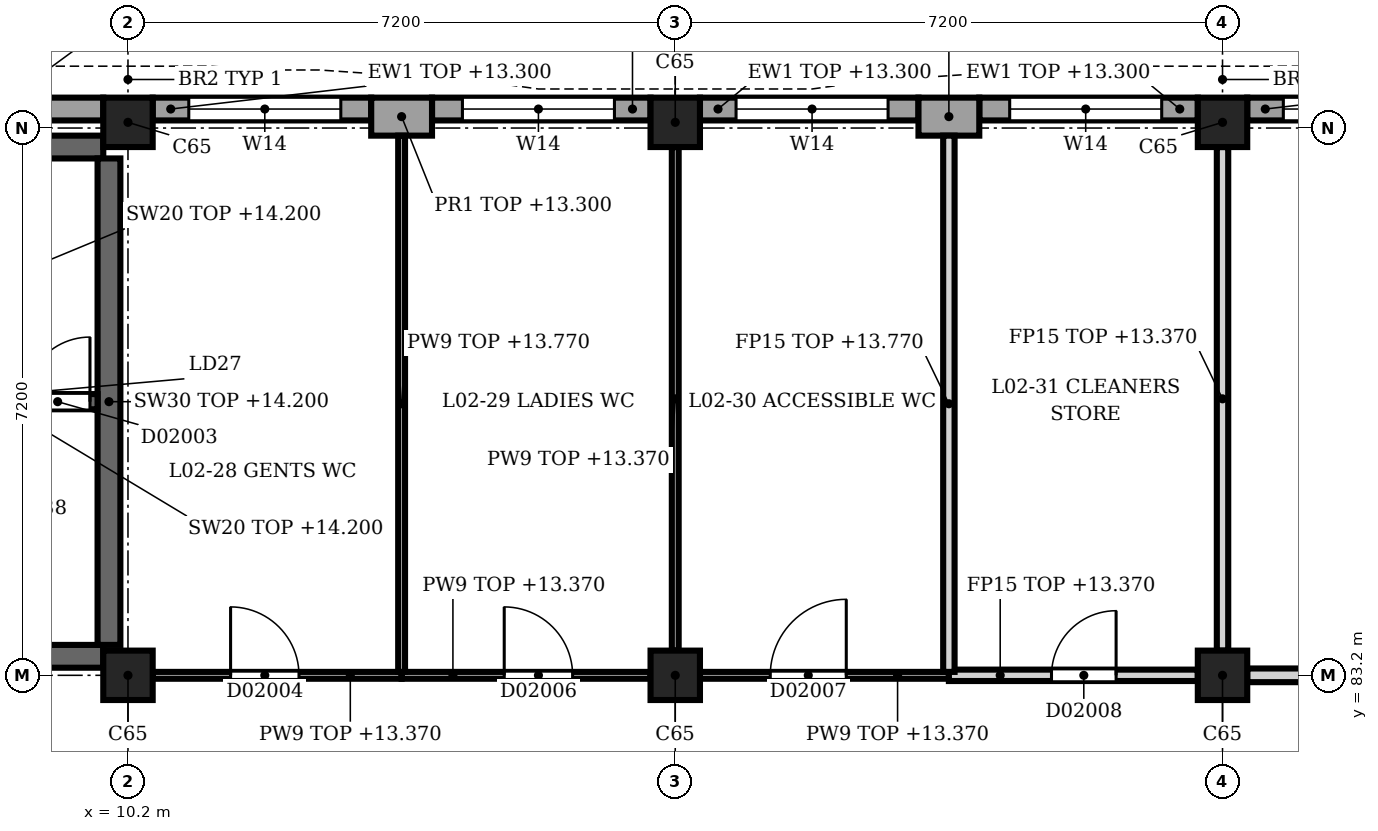
"""IFC4 building model, lengths in metres.
Left out: names, types, materials, properties, quantities, classifications, styles, units other than length and angle.
Written with IfcOpenShell. Run it as: python <this file> out.ifc"""

import sys

from ifc_helpers import new_model, si_unit, direction, frame, frame_2d, origin, origin_2d, place, context, subcontext, project, spatial, rectangle, extrude, element, fill, save


model = new_model("IFC4")
c1 = context("Model", 3, precision=1e-05, world=origin(), true_north=direction((0.0, 1.0)))
c2 = subcontext(c1, "Body", "Model", "MODEL_VIEW")
j1 = project(units=[si_unit("LENGTHUNIT", "METRE"), si_unit("PLANEANGLEUNIT", "RADIAN")], contexts=[c1])
p1 = place(None, origin())
s1 = spatial("IfcSite", under=j1, at=p1, CompositionType="ELEMENT")
p2 = place(p1, origin())
s2 = spatial("IfcBuilding", under=s1, at=p2, CompositionType="ELEMENT")
p3 = place(p2, frame((0.0, 0.0, 9.9)))
s3 = spatial("IfcBuildingStorey", under=s2, at=p3, CompositionType="ELEMENT", Elevation=9.9)
for number, where, z_axis, x_axis in (
    (1, (10.2, 83.2, 0.0), (0.0, 0.0, 1.0), (1.0, 0.0, 0.0)),
    (2, (10.2, 90.475, 0.0), (0.0, 0.0, 1.0), (1.0, 0.0, 0.0)),
    (3, (17.4, 83.2, 0.0), (0.0, 0.0, 1.0), (1.0, 0.0, 0.0)),
    (4, (17.4, 90.475, 0.0), (0.0, 0.0, 1.0), (1.0, 0.0, 0.0)),
    (5, (24.6, 83.2, 0.0), (0.0, 0.0, 1.0), (1.0, 0.0, 0.0)),
    (6, (24.6, 90.475, 0.0), (0.0, 0.0, 1.0), (1.0, 0.0, 0.0)),
):
    element("IfcColumn", number, at=place(p3, frame(where, z_axis=z_axis, x_axis=x_axis)), inside=s3, PredefinedType="COLUMN", context=c2, shape_type="SweptSolid", body=[
        extrude(rectangle(XDim=0.65, YDim=0.65, at=origin_2d()), origin(), (0.0, 0.0, 1.0), 4.5),
    ])
p4 = place(p3, frame((13.4, 90.55, 0.0), z_axis=(0.0, 0.0, 1.0), x_axis=(1.0, 0.0, 0.0)))
e7 = element("IfcWall", 7, at=p4, inside=s3, PredefinedType="SOLIDWALL", context=c2, shape_type="SweptSolid", body=[
    extrude(rectangle(XDim=0.8, YDim=0.5, at=frame_2d((0.4, 0.0))), origin(), (0.0, 0.0, 1.0), 3.4),
])
p5 = place(p3, frame((20.6, 90.55, 0.0), z_axis=(0.0, 0.0, 1.0), x_axis=(1.0, 0.0, 0.0)))
e8 = element("IfcWall", 8, at=p5, inside=s3, PredefinedType="SOLIDWALL", context=c2, shape_type="SweptSolid", body=[
    extrude(rectangle(XDim=0.8, YDim=0.5, at=frame_2d((0.4, 0.0))), origin(), (0.0, 0.0, 1.0), 3.4),
])
p6 = place(p3, frame((7.0, 90.65, 0.0), z_axis=(0.0, 0.0, 1.0), x_axis=(1.0, 0.0, 0.0)))
e9 = element("IfcWall", 9, at=p6, inside=s3, PredefinedType="SOLIDWALL", context=c2, shape_type="SweptSolid", body=[
    extrude(rectangle(XDim=2.875, YDim=0.3, at=frame_2d((1.438, 0.0))), origin(), (0.0, 0.0, 1.0), 3.4),
])
p7 = place(p3, frame((10.525, 90.65, 0.0), z_axis=(0.0, 0.0, 1.0), x_axis=(1.0, 0.0, 0.0)))
e10 = element("IfcWall", 10, at=p7, inside=s3, PredefinedType="SOLIDWALL", context=c2, shape_type="SweptSolid", body=[
    extrude(rectangle(XDim=2.875, YDim=0.3, at=frame_2d((1.438, 0.0))), origin(), (0.0, 0.0, 1.0), 3.4),
])
p8 = place(p7, frame((0.475, 0.0, 0.9)))
e11 = element("IfcOpeningElement", 11, at=p8, cuts=e10, PredefinedType="OPENING", context=c2, shape_type="SweptSolid", body=[
    extrude(rectangle(XDim=2.0, YDim=2.4, at=frame_2d((1.0, 1.2))), frame((0.0, 0.16, 0.0), z_axis=(0.0, -1.0, 0.0), x_axis=(1.0, 0.0, 0.0)), (0.0, 0.0, 1.0), 0.32),
])
p9 = place(p3, frame((14.2, 90.65, 0.0), z_axis=(0.0, 0.0, 1.0), x_axis=(1.0, 0.0, 0.0)))
e12 = element("IfcWall", 12, at=p9, inside=s3, PredefinedType="SOLIDWALL", context=c2, shape_type="SweptSolid", body=[
    extrude(rectangle(XDim=2.875, YDim=0.3, at=frame_2d((1.438, 0.0))), origin(), (0.0, 0.0, 1.0), 3.4),
])
p10 = place(p9, frame((0.4, 0.0, 0.9)))
e13 = element("IfcOpeningElement", 13, at=p10, cuts=e12, PredefinedType="OPENING", context=c2, shape_type="SweptSolid", body=[
    extrude(rectangle(XDim=2.0, YDim=2.4, at=frame_2d((1.0, 1.2))), frame((0.0, 0.16, 0.0), z_axis=(0.0, -1.0, 0.0), x_axis=(1.0, 0.0, 0.0)), (0.0, 0.0, 1.0), 0.32),
])
p11 = place(p3, frame((17.725, 90.65, 0.0), z_axis=(0.0, 0.0, 1.0), x_axis=(1.0, 0.0, 0.0)))
e14 = element("IfcWall", 14, at=p11, inside=s3, PredefinedType="SOLIDWALL", context=c2, shape_type="SweptSolid", body=[
    extrude(rectangle(XDim=2.875, YDim=0.3, at=frame_2d((1.438, 0.0))), origin(), (0.0, 0.0, 1.0), 3.4),
])
p12 = place(p11, frame((0.475, 0.0, 0.9)))
e15 = element("IfcOpeningElement", 15, at=p12, cuts=e14, PredefinedType="OPENING", context=c2, shape_type="SweptSolid", body=[
    extrude(rectangle(XDim=2.0, YDim=2.4, at=frame_2d((1.0, 1.2))), frame((0.0, 0.16, 0.0), z_axis=(0.0, -1.0, 0.0), x_axis=(1.0, 0.0, 0.0)), (0.0, 0.0, 1.0), 0.32),
])
p13 = place(p3, frame((21.4, 90.65, 0.0), z_axis=(0.0, 0.0, 1.0), x_axis=(1.0, 0.0, 0.0)))
e16 = element("IfcWall", 16, at=p13, inside=s3, PredefinedType="SOLIDWALL", context=c2, shape_type="SweptSolid", body=[
    extrude(rectangle(XDim=2.875, YDim=0.3, at=frame_2d((1.438, 0.0))), origin(), (0.0, 0.0, 1.0), 3.4),
])
p14 = place(p13, frame((0.4, 0.0, 0.9)))
e17 = element("IfcOpeningElement", 17, at=p14, cuts=e16, PredefinedType="OPENING", context=c2, shape_type="SweptSolid", body=[
    extrude(rectangle(XDim=2.0, YDim=2.4, at=frame_2d((1.0, 1.2))), frame((0.0, 0.16, 0.0), z_axis=(0.0, -1.0, 0.0), x_axis=(1.0, 0.0, 0.0)), (0.0, 0.0, 1.0), 0.32),
])
p15 = place(p3, frame((24.925, 90.65, 0.0), z_axis=(0.0, 0.0, 1.0), x_axis=(1.0, 0.0, 0.0)))
e18 = element("IfcWall", 18, at=p15, inside=s3, PredefinedType="SOLIDWALL", context=c2, shape_type="SweptSolid", body=[
    extrude(rectangle(XDim=2.875, YDim=0.3, at=frame_2d((1.438, 0.0))), origin(), (0.0, 0.0, 1.0), 3.4),
])
p16 = place(p15, frame((0.475, 0.0, 0.9)))
e19 = element("IfcOpeningElement", 19, at=p16, cuts=e18, PredefinedType="OPENING", context=c2, shape_type="SweptSolid", body=[
    extrude(rectangle(XDim=2.0, YDim=2.4, at=frame_2d((1.0, 1.2))), frame((0.0, 0.16, 0.0), z_axis=(0.0, -1.0, 0.0), x_axis=(1.0, 0.0, 0.0)), (0.0, 0.0, 1.0), 0.32),
])
p17 = place(p3, frame((3.25, 83.45, 0.0), z_axis=(0.0, 0.0, 1.0), x_axis=(1.0, 0.0, 0.0)))
e20 = element("IfcWall", 20, at=p17, inside=s3, PredefinedType="SHEAR", context=c2, shape_type="SweptSolid", body=[
    extrude(rectangle(XDim=6.625, YDim=0.3, at=frame_2d((3.312, 0.0))), origin(), (0.0, 0.0, 1.0), 4.3),
])
p18 = place(p17, frame((4.35, 0.0, 0.0)))
e21 = element("IfcOpeningElement", 21, at=p18, cuts=e20, PredefinedType="OPENING", context=c2, shape_type="SweptSolid", body=[
    extrude(rectangle(XDim=1.2, YDim=2.1, at=frame_2d((0.6, 1.05))), frame((0.0, 0.16, 0.0), z_axis=(0.0, -1.0, 0.0), x_axis=(1.0, 0.0, 0.0)), (0.0, 0.0, 1.0), 0.32),
])
p19 = place(p3, frame((3.25, 90.15, 0.0), z_axis=(0.0, 0.0, 1.0), x_axis=(1.0, 0.0, 0.0)))
e22 = element("IfcWall", 22, at=p19, inside=s3, PredefinedType="SHEAR", context=c2, shape_type="SweptSolid", body=[
    extrude(rectangle(XDim=6.625, YDim=0.3, at=frame_2d((3.312, 0.0))), origin(), (0.0, 0.0, 1.0), 4.3),
])
p20 = place(p19, frame((1.25, 0.0, 1.2)))
e23 = element("IfcOpeningElement", 23, at=p20, cuts=e22, PredefinedType="OPENING", context=c2, shape_type="SweptSolid", body=[
    extrude(rectangle(XDim=0.6, YDim=1.8, at=frame_2d((0.3, 0.9))), frame((0.0, 0.16, 0.0), z_axis=(0.0, -1.0, 0.0), x_axis=(1.0, 0.0, 0.0)), (0.0, 0.0, 1.0), 0.32),
])
p21 = place(p3, frame((9.95, 83.6, 0.0), z_axis=(0.0, 0.0, 1.0), x_axis=(0.0, 1.0, 0.0)))
e24 = element("IfcWall", 24, at=p21, inside=s3, PredefinedType="SHEAR", context=c2, shape_type="SweptSolid", body=[
    extrude(rectangle(XDim=6.4, YDim=0.3, at=frame_2d((3.2, 0.0))), origin(), (0.0, 0.0, 1.0), 4.3),
])
p22 = place(p3, frame((9.8, 86.8, 0.0), z_axis=(0.0, 0.0, 1.0), x_axis=(-1.0, 0.0, 0.0)))
e25 = element("IfcWall", 25, at=p22, inside=s3, PredefinedType="SHEAR", context=c2, shape_type="SweptSolid", body=[
    extrude(rectangle(XDim=3.25, YDim=0.2, at=frame_2d((1.625, 0.0))), origin(), (0.0, 0.0, 1.0), 4.3),
])
p23 = place(p22, frame((1.7, 0.0, 0.0)))
e26 = element("IfcOpeningElement", 26, at=p23, cuts=e25, PredefinedType="OPENING", context=c2, shape_type="SweptSolid", body=[
    extrude(rectangle(XDim=1.1, YDim=2.1, at=frame_2d((0.55, 1.05))), frame((0.0, 0.11, 0.0), z_axis=(0.0, -1.0, 0.0), x_axis=(1.0, 0.0, 0.0)), (0.0, 0.0, 1.0), 0.22),
])
p24 = place(p22, frame((0.1, 0.0, 0.0)))
e27 = element("IfcOpeningElement", 27, at=p24, cuts=e25, PredefinedType="OPENING", context=c2, shape_type="SweptSolid", body=[
    extrude(rectangle(XDim=0.85, YDim=2.1, at=frame_2d((0.425, 1.05))), frame((0.0, 0.11, 0.0), z_axis=(0.0, -1.0, 0.0), x_axis=(1.0, 0.0, 0.0)), (0.0, 0.0, 1.0), 0.22),
])
p25 = place(p3, frame((10.525, 83.2, 0.0), z_axis=(0.0, 0.0, 1.0), x_axis=(1.0, 0.0, 0.0)))
e28 = element("IfcWall", 28, at=p25, inside=s3, PredefinedType="PARTITIONING", context=c2, shape_type="SweptSolid", body=[
    extrude(rectangle(XDim=3.275, YDim=0.09, at=frame_2d((1.638, 0.0))), origin(), (0.0, 0.0, 1.0), 3.47),
])
p26 = place(p25, frame((1.025, 0.0, 0.0)))
e29 = element("IfcOpeningElement", 29, at=p26, cuts=e28, PredefinedType="OPENING", context=c2, shape_type="SweptSolid", body=[
    extrude(rectangle(XDim=0.9, YDim=2.1, at=frame_2d((0.45, 1.05))), frame((0.0, 0.055, 0.0), z_axis=(0.0, -1.0, 0.0), x_axis=(1.0, 0.0, 0.0)), (0.0, 0.0, 1.0), 0.11),
])
p27 = place(p3, frame((13.8, 83.2, 0.0), z_axis=(0.0, 0.0, 1.0), x_axis=(1.0, 0.0, 0.0)))
e30 = element("IfcWall", 30, at=p27, inside=s3, PredefinedType="PARTITIONING", context=c2, shape_type="SweptSolid", body=[
    extrude(rectangle(XDim=3.275, YDim=0.09, at=frame_2d((1.637, 0.0))), origin(), (0.0, 0.0, 1.0), 3.47),
])
p28 = place(p27, frame((1.35, 0.0, 0.0)))
e31 = element("IfcOpeningElement", 31, at=p28, cuts=e30, PredefinedType="OPENING", context=c2, shape_type="SweptSolid", body=[
    extrude(rectangle(XDim=0.9, YDim=2.1, at=frame_2d((0.45, 1.05))), frame((0.0, 0.055, 0.0), z_axis=(0.0, -1.0, 0.0), x_axis=(1.0, 0.0, 0.0)), (0.0, 0.0, 1.0), 0.11),
])
p29 = place(p3, frame((17.725, 83.2, 0.0), z_axis=(0.0, 0.0, 1.0), x_axis=(1.0, 0.0, 0.0)))
e32 = element("IfcWall", 32, at=p29, inside=s3, PredefinedType="PARTITIONING", context=c2, shape_type="SweptSolid", body=[
    extrude(rectangle(XDim=3.275, YDim=0.09, at=frame_2d((1.637, 0.0))), origin(), (0.0, 0.0, 1.0), 3.47),
])
p30 = place(p29, frame((0.925, 0.0, 0.0)))
e33 = element("IfcOpeningElement", 33, at=p30, cuts=e32, PredefinedType="OPENING", context=c2, shape_type="SweptSolid", body=[
    extrude(rectangle(XDim=1.0, YDim=2.2, at=frame_2d((0.5, 1.1))), frame((0.0, 0.055, 0.0), z_axis=(0.0, -1.0, 0.0), x_axis=(1.0, 0.0, 0.0)), (0.0, 0.0, 1.0), 0.11),
])
p31 = place(p3, frame((21.0, 83.2, 0.0), z_axis=(0.0, 0.0, 1.0), x_axis=(1.0, 0.0, 0.0)))
e34 = element("IfcWall", 34, at=p31, inside=s3, PredefinedType="PARTITIONING", context=c2, shape_type="SweptSolid", body=[
    extrude(rectangle(XDim=3.275, YDim=0.15, at=frame_2d((1.637, 0.0))), origin(), (0.0, 0.0, 1.0), 3.47),
])
p32 = place(p31, frame((1.35, 0.0, 0.0)))
e35 = element("IfcOpeningElement", 35, at=p32, cuts=e34, PredefinedType="OPENING", context=c2, shape_type="SweptSolid", body=[
    extrude(rectangle(XDim=0.85, YDim=2.1, at=frame_2d((0.425, 1.05))), frame((0.0, 0.085, 0.0), z_axis=(0.0, -1.0, 0.0), x_axis=(1.0, 0.0, 0.0)), (0.0, 0.0, 1.0), 0.17),
])
p33 = place(p3, frame((24.925, 83.2, 0.0), z_axis=(0.0, 0.0, 1.0), x_axis=(1.0, 0.0, 0.0)))
e36 = element("IfcWall", 36, at=p33, inside=s3, PredefinedType="PARTITIONING", context=c2, shape_type="SweptSolid", body=[
    extrude(rectangle(XDim=6.55, YDim=0.18, at=frame_2d((3.275, 0.0))), origin(), (0.0, 0.0, 1.0), 3.47),
])
p34 = place(p33, frame((4.525, 0.0, 0.0)))
e37 = element("IfcOpeningElement", 37, at=p34, cuts=e36, PredefinedType="OPENING", context=c2, shape_type="SweptSolid", body=[
    extrude(rectangle(XDim=1.1, YDim=2.3, at=frame_2d((0.55, 1.15))), frame((0.0, 0.1, 0.0), z_axis=(0.0, -1.0, 0.0), x_axis=(1.0, 0.0, 0.0)), (0.0, 0.0, 1.0), 0.2),
])
p35 = place(p3, frame((13.8, 83.245, 0.0), z_axis=(0.0, 0.0, 1.0), x_axis=(0.0, 1.0, 0.0)))
e38 = element("IfcWall", 38, at=p35, inside=s3, PredefinedType="PARTITIONING", context=c2, shape_type="SweptSolid", body=[
    extrude(rectangle(XDim=7.055, YDim=0.09, at=frame_2d((3.527, 0.0))), origin(), (0.0, 0.0, 1.0), 3.87),
])
p36 = place(p3, frame((17.4, 83.525, 0.0), z_axis=(0.0, 0.0, 1.0), x_axis=(0.0, 1.0, 0.0)))
e39 = element("IfcWall", 39, at=p36, inside=s3, PredefinedType="PARTITIONING", context=c2, shape_type="SweptSolid", body=[
    extrude(rectangle(XDim=6.625, YDim=0.09, at=frame_2d((3.312, 0.0))), origin(), (0.0, 0.0, 1.0), 3.47),
])
p37 = place(p3, frame((21.0, 83.245, 0.0), z_axis=(0.0, 0.0, 1.0), x_axis=(0.0, 1.0, 0.0)))
e40 = element("IfcWall", 40, at=p37, inside=s3, PredefinedType="PARTITIONING", context=c2, shape_type="SweptSolid", body=[
    extrude(rectangle(XDim=7.055, YDim=0.15, at=frame_2d((3.527, 0.0))), origin(), (0.0, 0.0, 1.0), 3.87),
])
p38 = place(p3, frame((24.6, 83.525, 0.0), z_axis=(0.0, 0.0, 1.0), x_axis=(0.0, 1.0, 0.0)))
e41 = element("IfcWall", 41, at=p38, inside=s3, PredefinedType="PARTITIONING", context=c2, shape_type="SweptSolid", body=[
    extrude(rectangle(XDim=6.625, YDim=0.15, at=frame_2d((3.312, 0.0))), origin(), (0.0, 0.0, 1.0), 3.47),
])
p39 = place(p8, origin())
e42 = element("IfcWindow", 42, at=p39, inside=s3, PartitioningType="SINGLE_PANEL", PredefinedType="WINDOW", context=c2, shape_type="SweptSolid", body=[
    extrude(rectangle(XDim=2.0, YDim=2.4, at=frame_2d((1.0, 1.2))), frame((0.0, 0.03, 0.0), z_axis=(0.0, -1.0, 0.0), x_axis=(1.0, 0.0, 0.0)), (0.0, 0.0, 1.0), 0.06),
])
fill(e11, e42)
p40 = place(p10, origin())
e43 = element("IfcWindow", 43, at=p40, inside=s3, PartitioningType="SINGLE_PANEL", PredefinedType="WINDOW", context=c2, shape_type="SweptSolid", body=[
    extrude(rectangle(XDim=2.0, YDim=2.4, at=frame_2d((1.0, 1.2))), frame((0.0, 0.03, 0.0), z_axis=(0.0, -1.0, 0.0), x_axis=(1.0, 0.0, 0.0)), (0.0, 0.0, 1.0), 0.06),
])
fill(e13, e43)
p41 = place(p12, origin())
e44 = element("IfcWindow", 44, at=p41, inside=s3, PartitioningType="SINGLE_PANEL", PredefinedType="WINDOW", context=c2, shape_type="SweptSolid", body=[
    extrude(rectangle(XDim=2.0, YDim=2.4, at=frame_2d((1.0, 1.2))), frame((0.0, 0.03, 0.0), z_axis=(0.0, -1.0, 0.0), x_axis=(1.0, 0.0, 0.0)), (0.0, 0.0, 1.0), 0.06),
])
fill(e15, e44)
p42 = place(p14, origin())
e45 = element("IfcWindow", 45, at=p42, inside=s3, PartitioningType="SINGLE_PANEL", PredefinedType="WINDOW", context=c2, shape_type="SweptSolid", body=[
    extrude(rectangle(XDim=2.0, YDim=2.4, at=frame_2d((1.0, 1.2))), frame((0.0, 0.03, 0.0), z_axis=(0.0, -1.0, 0.0), x_axis=(1.0, 0.0, 0.0)), (0.0, 0.0, 1.0), 0.06),
])
fill(e17, e45)
p43 = place(p16, origin())
e46 = element("IfcWindow", 46, at=p43, inside=s3, PartitioningType="SINGLE_PANEL", PredefinedType="WINDOW", context=c2, shape_type="SweptSolid", body=[
    extrude(rectangle(XDim=2.0, YDim=2.4, at=frame_2d((1.0, 1.2))), frame((0.0, 0.03, 0.0), z_axis=(0.0, -1.0, 0.0), x_axis=(1.0, 0.0, 0.0)), (0.0, 0.0, 1.0), 0.06),
])
fill(e19, e46)
p44 = place(p24, origin())
e47 = element("IfcDoor", 47, at=p44, inside=s3, OperationType="SINGLE_SWING_LEFT", PredefinedType="DOOR", context=c2, shape_type="SweptSolid", body=[
    extrude(rectangle(XDim=0.85, YDim=2.1, at=frame_2d((0.425, 1.05))), frame((0.0, 0.025, 0.0), z_axis=(0.0, -1.0, 0.0), x_axis=(1.0, 0.0, 0.0)), (0.0, 0.0, 1.0), 0.05),
])
fill(e27, e47)
p45 = place(p26, origin())
e48 = element("IfcDoor", 48, at=p45, inside=s3, OperationType="SINGLE_SWING_LEFT", PredefinedType="DOOR", context=c2, shape_type="SweptSolid", body=[
    extrude(rectangle(XDim=0.9, YDim=2.1, at=frame_2d((0.45, 1.05))), frame((0.0, 0.025, 0.0), z_axis=(0.0, -1.0, 0.0), x_axis=(1.0, 0.0, 0.0)), (0.0, 0.0, 1.0), 0.05),
])
fill(e29, e48)
p46 = place(p28, origin())
e49 = element("IfcDoor", 49, at=p46, inside=s3, OperationType="SINGLE_SWING_RIGHT", PredefinedType="DOOR", context=c2, shape_type="SweptSolid", body=[
    extrude(rectangle(XDim=0.9, YDim=2.1, at=frame_2d((0.45, 1.05))), frame((0.0, 0.025, 0.0), z_axis=(0.0, -1.0, 0.0), x_axis=(1.0, 0.0, 0.0)), (0.0, 0.0, 1.0), 0.05),
])
fill(e31, e49)
p47 = place(p30, origin())
e50 = element("IfcDoor", 50, at=p47, inside=s3, OperationType="SINGLE_SWING_LEFT", PredefinedType="DOOR", context=c2, shape_type="SweptSolid", body=[
    extrude(rectangle(XDim=1.0, YDim=2.2, at=frame_2d((0.5, 1.1))), frame((0.0, 0.025, 0.0), z_axis=(0.0, -1.0, 0.0), x_axis=(1.0, 0.0, 0.0)), (0.0, 0.0, 1.0), 0.05),
])
fill(e33, e50)
p48 = place(p32, origin())
e51 = element("IfcDoor", 51, at=p48, inside=s3, OperationType="SINGLE_SWING_RIGHT", PredefinedType="DOOR", context=c2, shape_type="SweptSolid", body=[
    extrude(rectangle(XDim=0.85, YDim=2.1, at=frame_2d((0.425, 1.05))), frame((0.0, 0.025, 0.0), z_axis=(0.0, -1.0, 0.0), x_axis=(1.0, 0.0, 0.0)), (0.0, 0.0, 1.0), 0.05),
])
fill(e35, e51)
save(model, sys.argv[1])
